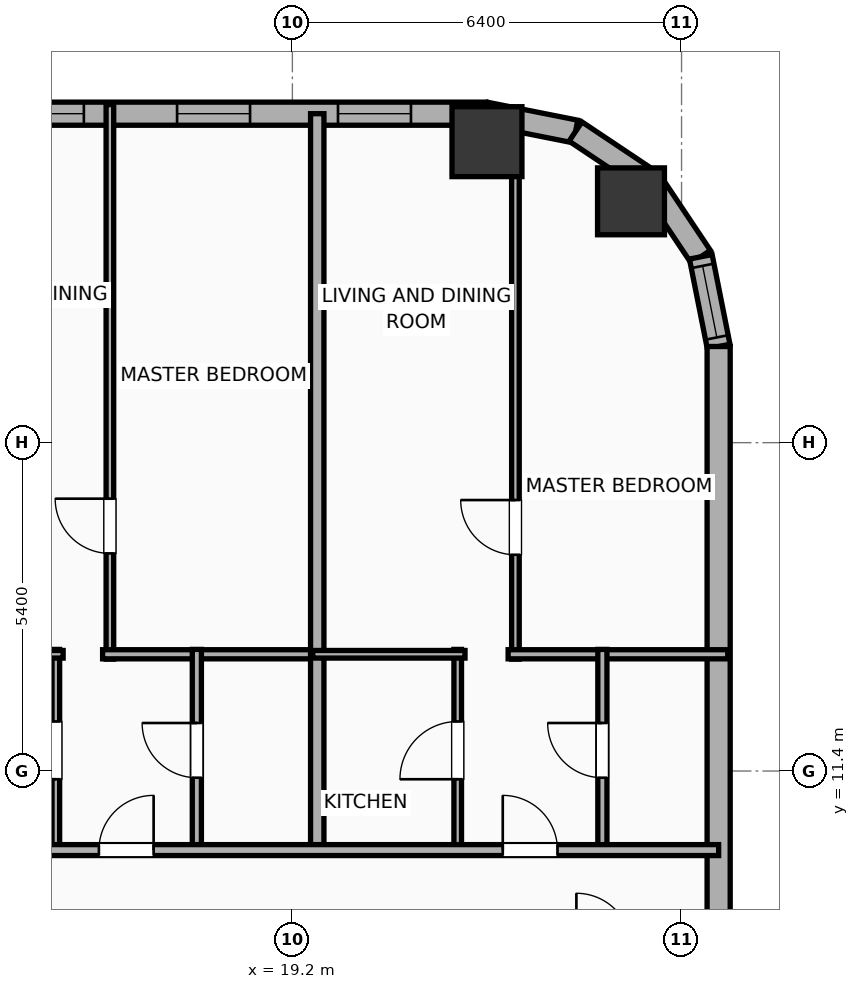
"""IFC4 building model, lengths in metres.
Left out: names, types, materials, properties, quantities, classifications, styles, units other than length and angle.
Written with IfcOpenShell. Run it as: python <this file> out.ifc"""

import sys

from ifc_helpers import new_model, si_unit, direction, frame, frame_2d, origin, origin_2d, place, context, subcontext, project, spatial, rectangle, hollow_rectangle, hollow_circle, extrude, element, fill, save


model = new_model("IFC4")
c1 = context("Model", 3, precision=1e-05, world=origin(), true_north=direction((0.0, 1.0)))
c2 = subcontext(c1, "Body", "Model", "MODEL_VIEW")
j1 = project(units=[si_unit("LENGTHUNIT", "METRE"), si_unit("PLANEANGLEUNIT", "RADIAN")], contexts=[c1])
p1 = place(None, origin())
s1 = spatial("IfcSite", under=j1, at=p1, CompositionType="ELEMENT")
p2 = place(p1, origin())
s2 = spatial("IfcBuilding", under=s1, at=p2, CompositionType="ELEMENT")
p3 = place(p2, frame((0.0, 0.0, 45.5)))
s3 = spatial("IfcBuildingStorey", under=s2, at=p3, CompositionType="ELEMENT", Elevation=45.5)
p4 = place(p3, frame((24.769, 20.769, 0.0), z_axis=(0.0, 0.0, 1.0), x_axis=(1.0, 0.0, 0.0)))
e1 = element("IfcColumn", 1, at=p4, inside=s3, PredefinedType="COLUMN", context=c2, shape_type="SweptSolid", body=[
    extrude(hollow_circle(Radius=0.55, WallThickness=0.036, at=origin_2d()), origin(), (0.0, 0.0, 1.0), 3.9),
])
p5 = place(p3, frame((22.4, 21.75, 0.0), z_axis=(0.0, 0.0, 1.0), x_axis=(1.0, 0.0, 0.0)))
e2 = element("IfcColumn", 2, at=p5, inside=s3, PredefinedType="COLUMN", context=c2, shape_type="SweptSolid", body=[
    extrude(hollow_rectangle(XDim=1.15, YDim=1.15, WallThickness=0.04, at=origin_2d()), origin(), (0.0, 0.0, 1.0), 3.9),
])
p6 = place(p3, frame((-29.581, 22.21, 0.0), z_axis=(0.0, 0.0, 1.0), x_axis=(1.0, 0.0, 0.0)))
e3 = element("IfcWall", 3, at=p6, inside=s3, PredefinedType="ELEMENTEDWALL", context=c2, shape_type="SweptSolid", body=[
    extrude(rectangle(XDim=51.963, YDim=0.38, at=frame_2d((25.981, 0.0))), origin(), (0.0, 0.0, 1.0), 3.65),
])
p7 = place(p6, frame((25.631, 0.0, 0.75)))
e4 = element("IfcOpeningElement", 4, at=p7, cuts=e3, PredefinedType="OPENING", context=c2, shape_type="SweptSolid", body=[
    extrude(rectangle(XDim=2.4, YDim=2.1, at=frame_2d((1.2, 1.05))), frame((0.0, 0.2, 0.0), z_axis=(0.0, -1.0, 0.0), x_axis=(1.0, 0.0, 0.0)), (0.0, 0.0, 1.0), 0.4),
])
p8 = place(p6, frame((42.952, 0.0, 0.75)))
e5 = element("IfcOpeningElement", 5, at=p8, cuts=e3, PredefinedType="OPENING", context=c2, shape_type="SweptSolid", body=[
    extrude(rectangle(XDim=2.4, YDim=2.1, at=frame_2d((1.2, 1.05))), frame((0.0, 0.2, 0.0), z_axis=(0.0, -1.0, 0.0), x_axis=(1.0, 0.0, 0.0)), (0.0, 0.0, 1.0), 0.4),
])
p9 = place(p6, frame((1.731, 0.0, 0.75)))
e6 = element("IfcOpeningElement", 6, at=p9, cuts=e3, PredefinedType="OPENING", context=c2, shape_type="SweptSolid", body=[
    extrude(rectangle(XDim=1.2, YDim=2.05, at=frame_2d((0.6, 1.025))), frame((0.0, 0.2, 0.0), z_axis=(0.0, -1.0, 0.0), x_axis=(1.0, 0.0, 0.0)), (0.0, 0.0, 1.0), 0.4),
])
p10 = place(p6, frame((5.272, 0.0, 0.75)))
e7 = element("IfcOpeningElement", 7, at=p10, cuts=e3, PredefinedType="OPENING", context=c2, shape_type="SweptSolid", body=[
    extrude(rectangle(XDim=1.2, YDim=2.05, at=frame_2d((0.6, 1.025))), frame((0.0, 0.2, 0.0), z_axis=(0.0, -1.0, 0.0), x_axis=(1.0, 0.0, 0.0)), (0.0, 0.0, 1.0), 0.4),
])
p11 = place(p6, frame((8.356, 0.0, 0.75)))
e8 = element("IfcOpeningElement", 8, at=p11, cuts=e3, PredefinedType="OPENING", context=c2, shape_type="SweptSolid", body=[
    extrude(rectangle(XDim=1.2, YDim=2.05, at=frame_2d((0.6, 1.025))), frame((0.0, 0.2, 0.0), z_axis=(0.0, -1.0, 0.0), x_axis=(1.0, 0.0, 0.0)), (0.0, 0.0, 1.0), 0.4),
])
p12 = place(p6, frame((15.632, 0.0, 0.75)))
e9 = element("IfcOpeningElement", 9, at=p12, cuts=e3, PredefinedType="OPENING", context=c2, shape_type="SweptSolid", body=[
    extrude(rectangle(XDim=1.2, YDim=2.05, at=frame_2d((0.6, 1.025))), frame((0.0, 0.2, 0.0), z_axis=(0.0, -1.0, 0.0), x_axis=(1.0, 0.0, 0.0)), (0.0, 0.0, 1.0), 0.4),
])
p13 = place(p6, frame((12.137, 0.0, 0.75)))
e10 = element("IfcOpeningElement", 10, at=p13, cuts=e3, PredefinedType="OPENING", context=c2, shape_type="SweptSolid", body=[
    extrude(rectangle(XDim=1.2, YDim=2.05, at=frame_2d((0.6, 1.025))), frame((0.0, 0.2, 0.0), z_axis=(0.0, -1.0, 0.0), x_axis=(1.0, 0.0, 0.0)), (0.0, 0.0, 1.0), 0.4),
])
p14 = place(p6, frame((18.756, 0.0, 0.75)))
e11 = element("IfcOpeningElement", 11, at=p14, cuts=e3, PredefinedType="OPENING", context=c2, shape_type="SweptSolid", body=[
    extrude(rectangle(XDim=1.2, YDim=2.05, at=frame_2d((0.6, 1.025))), frame((0.0, 0.2, 0.0), z_axis=(0.0, -1.0, 0.0), x_axis=(1.0, 0.0, 0.0)), (0.0, 0.0, 1.0), 0.4),
])
p15 = place(p6, frame((22.907, 0.0, 0.75)))
e12 = element("IfcOpeningElement", 12, at=p15, cuts=e3, PredefinedType="OPENING", context=c2, shape_type="SweptSolid", body=[
    extrude(rectangle(XDim=1.2, YDim=2.05, at=frame_2d((0.6, 1.025))), frame((0.0, 0.2, 0.0), z_axis=(0.0, -1.0, 0.0), x_axis=(1.0, 0.0, 0.0)), (0.0, 0.0, 1.0), 0.4),
])
p16 = place(p6, frame((36.381, 0.0, 0.75)))
e13 = element("IfcOpeningElement", 13, at=p16, cuts=e3, PredefinedType="OPENING", context=c2, shape_type="SweptSolid", body=[
    extrude(rectangle(XDim=1.2, YDim=2.05, at=frame_2d((0.6, 1.025))), frame((0.0, 0.2, 0.0), z_axis=(0.0, -1.0, 0.0), x_axis=(1.0, 0.0, 0.0)), (0.0, 0.0, 1.0), 0.4),
])
p17 = place(p6, frame((32.886, 0.0, 0.75)))
e14 = element("IfcOpeningElement", 14, at=p17, cuts=e3, PredefinedType="OPENING", context=c2, shape_type="SweptSolid", body=[
    extrude(rectangle(XDim=1.2, YDim=2.05, at=frame_2d((0.6, 1.025))), frame((0.0, 0.2, 0.0), z_axis=(0.0, -1.0, 0.0), x_axis=(1.0, 0.0, 0.0)), (0.0, 0.0, 1.0), 0.4),
])
p18 = place(p6, frame((39.556, 0.0, 0.75)))
e15 = element("IfcOpeningElement", 15, at=p18, cuts=e3, PredefinedType="OPENING", context=c2, shape_type="SweptSolid", body=[
    extrude(rectangle(XDim=1.2, YDim=2.05, at=frame_2d((0.6, 1.025))), frame((0.0, 0.2, 0.0), z_axis=(0.0, -1.0, 0.0), x_axis=(1.0, 0.0, 0.0)), (0.0, 0.0, 1.0), 0.4),
])
p19 = place(p6, frame((46.885, 0.0, 0.75)))
e16 = element("IfcOpeningElement", 16, at=p19, cuts=e3, PredefinedType="OPENING", context=c2, shape_type="SweptSolid", body=[
    extrude(rectangle(XDim=1.2, YDim=2.05, at=frame_2d((0.6, 1.025))), frame((0.0, 0.2, 0.0), z_axis=(0.0, -1.0, 0.0), x_axis=(1.0, 0.0, 0.0)), (0.0, 0.0, 1.0), 0.4),
])
p20 = place(p6, frame((49.531, 0.0, 0.75)))
e17 = element("IfcOpeningElement", 17, at=p20, cuts=e3, PredefinedType="OPENING", context=c2, shape_type="SweptSolid", body=[
    extrude(rectangle(XDim=1.2, YDim=2.05, at=frame_2d((0.6, 1.025))), frame((0.0, 0.2, 0.0), z_axis=(0.0, -1.0, 0.0), x_axis=(1.0, 0.0, 0.0)), (0.0, 0.0, 1.0), 0.4),
])
p21 = place(p3, frame((22.381, 22.21, 0.0), z_axis=(0.0, 0.0, 1.0), x_axis=(0.980786132421, -0.195086038585, 0.0)))
e18 = element("IfcWall", 18, at=p21, inside=s3, PredefinedType="ELEMENTEDWALL", context=c2, shape_type="SweptSolid", body=[
    extrude(rectangle(XDim=1.504, YDim=0.38, at=frame_2d((0.752, 0.0))), origin(), (0.0, 0.0, 1.0), 3.65),
])
for number, where, z_axis, x_axis in (
    (19, (23.857, 21.917, 0.0), (0.0, 0.0, 1.0), (0.831, -0.556, 0.0)),
    (20, (25.091, 21.091, 0.0), (0.0, 0.0, 1.0), (0.556, -0.831, 0.0)),
):
    element("IfcWall", number, at=place(p3, frame(where, z_axis=z_axis, x_axis=x_axis)), inside=s3, PredefinedType="ELEMENTEDWALL", context=c2, shape_type="SweptSolid", body=[
        extrude(rectangle(XDim=1.485, YDim=0.38, at=frame_2d((0.743, 0.0))), origin(), (0.0, 0.0, 1.0), 3.65),
    ])
p22 = place(p3, frame((25.917, 19.857, 0.0), z_axis=(0.0, 0.0, 1.0), x_axis=(0.195086038585, -0.980786132421, 0.0)))
e21 = element("IfcWall", 21, at=p22, inside=s3, PredefinedType="ELEMENTEDWALL", context=c2, shape_type="SweptSolid", body=[
    extrude(rectangle(XDim=1.504, YDim=0.38, at=frame_2d((0.752, 0.0))), origin(), (0.0, 0.0, 1.0), 3.65),
])
p23 = place(p22, frame((0.152, 0.0, 0.75)))
e22 = element("IfcOpeningElement", 22, at=p23, cuts=e21, PredefinedType="OPENING", context=c2, shape_type="SweptSolid", body=[
    extrude(rectangle(XDim=1.2, YDim=2.05, at=frame_2d((0.6, 1.025))), frame((0.0, 0.2, 0.0), z_axis=(0.0, -1.0, 0.0), x_axis=(1.0, 0.0, 0.0)), (0.0, 0.0, 1.0), 0.4),
])
p24 = place(p3, frame((26.21, 18.381, 0.0), z_axis=(0.0, 0.0, 1.0), x_axis=(0.0, -1.0, 0.0)))
e23 = element("IfcWall", 23, at=p24, inside=s3, PredefinedType="ELEMENTEDWALL", context=c2, shape_type="SweptSolid", body=[
    extrude(rectangle(XDim=36.763, YDim=0.38, at=frame_2d((18.381, 0.0))), origin(), (0.0, 0.0, 1.0), 3.65),
])
p25 = place(p3, frame((16.199, 13.24, 0.0), z_axis=(0.0, 0.0, 1.0), x_axis=(0.0, 1.0, 0.0)))
e24 = element("IfcWall", 24, at=p25, inside=s3, PredefinedType="PARTITIONING", context=c2, shape_type="SweptSolid", body=[
    extrude(rectangle(XDim=9.12, YDim=0.125, at=frame_2d((4.56, 0.0))), origin(), (0.0, 0.0, 1.0), 3.65),
])
p26 = place(p25, frame((1.739, 0.0, 0.0)))
e25 = element("IfcOpeningElement", 25, at=p26, cuts=e24, PredefinedType="OPENING", context=c2, shape_type="SweptSolid", body=[
    extrude(rectangle(XDim=0.9, YDim=2.05, at=frame_2d((0.45, 1.025))), frame((0.0, 0.073, 0.0), z_axis=(0.0, -1.0, 0.0), x_axis=(1.0, 0.0, 0.0)), (0.0, 0.0, 1.0), 0.145),
])
p27 = place(p3, frame((16.079, 13.32, 0.0), z_axis=(0.0, 0.0, 1.0), x_axis=(1.0, 0.0, 0.0)))
e26 = element("IfcWall", 26, at=p27, inside=s3, PredefinedType="PLUMBINGWALL", context=c2, shape_type="SweptSolid", body=[
    extrude(rectangle(XDim=3.605, YDim=0.15, at=frame_2d((1.802, 0.0))), origin(), (0.0, 0.0, 1.0), 3.65),
])
p28 = place(p3, frame((15.31, 10.08, 0.0), z_axis=(0.0, 0.0, 1.0), x_axis=(0.0, 1.0, 0.0)))
e27 = element("IfcWall", 27, at=p28, inside=s3, PredefinedType="PARTITIONING", context=c2, shape_type="SweptSolid", body=[
    extrude(rectangle(XDim=3.32, YDim=0.125, at=frame_2d((1.66, 0.0))), origin(), (0.0, 0.0, 1.0), 3.65),
])
p29 = place(p28, frame((1.185, 0.0, 0.0)))
e28 = element("IfcOpeningElement", 28, at=p29, cuts=e27, PredefinedType="OPENING", context=c2, shape_type="SweptSolid", body=[
    extrude(rectangle(XDim=0.95, YDim=2.05, at=frame_2d((0.475, 1.025))), frame((0.0, 0.073, 0.0), z_axis=(0.0, -1.0, 0.0), x_axis=(1.0, 0.0, 0.0)), (0.0, 0.0, 1.0), 0.145),
])
p30 = place(p3, frame((12.925, 13.32, 0.0), z_axis=(0.0, 0.0, 1.0), x_axis=(1.0, 0.0, 0.0)))
e29 = element("IfcWall", 29, at=p30, inside=s3, PredefinedType="PARTITIONING", context=c2, shape_type="SweptSolid", body=[
    extrude(rectangle(XDim=2.505, YDim=0.125, at=frame_2d((1.252, 0.0))), origin(), (0.0, 0.0, 1.0), 3.65),
])
p31 = place(p3, frame((17.629, 10.08, 0.0), z_axis=(0.0, 0.0, 1.0), x_axis=(0.0, 1.0, 0.0)))
e30 = element("IfcWall", 30, at=p31, inside=s3, PredefinedType="PLUMBINGWALL", context=c2, shape_type="SweptSolid", body=[
    extrude(rectangle(XDim=3.32, YDim=0.15, at=frame_2d((1.66, 0.0))), origin(), (0.0, 0.0, 1.0), 3.65),
])
p32 = place(p31, frame((1.21, 0.0, 0.0)))
e31 = element("IfcOpeningElement", 31, at=p32, cuts=e30, PredefinedType="OPENING", context=c2, shape_type="SweptSolid", body=[
    extrude(rectangle(XDim=0.9, YDim=2.05, at=frame_2d((0.45, 1.025))), frame((0.0, 0.085, 0.0), z_axis=(0.0, -1.0, 0.0), x_axis=(1.0, 0.0, 0.0)), (0.0, 0.0, 1.0), 0.17),
])
p33 = place(p3, frame((19.609, 10.02, 0.0), z_axis=(0.0, 0.0, 1.0), x_axis=(0.0, 1.0, 0.0)))
e32 = element("IfcWall", 32, at=p33, inside=s3, PredefinedType="PARTITIONING", context=c2, shape_type="SweptSolid", body=[
    extrude(rectangle(XDim=12.19, YDim=0.22, at=frame_2d((6.095, 0.0))), origin(), (0.0, 0.0, 1.0), 3.65),
])
p34 = place(p3, frame((22.868, 13.24, 0.0), z_axis=(0.0, 0.0, 1.0), x_axis=(0.0, 1.0, 0.0)))
e33 = element("IfcWall", 33, at=p34, inside=s3, PredefinedType="PARTITIONING", context=c2, shape_type="SweptSolid", body=[
    extrude(rectangle(XDim=9.026, YDim=0.125, at=frame_2d((4.513, 0.0))), origin(), (0.0, 0.0, 1.0), 2.94),
])
p35 = place(p34, frame((1.716, 0.0, 0.0)))
e34 = element("IfcOpeningElement", 34, at=p35, cuts=e33, PredefinedType="OPENING", context=c2, shape_type="SweptSolid", body=[
    extrude(rectangle(XDim=0.9, YDim=2.05, at=frame_2d((0.45, 1.025))), frame((0.0, 0.073, 0.0), z_axis=(0.0, -1.0, 0.0), x_axis=(1.0, 0.0, 0.0)), (0.0, 0.0, 1.0), 0.145),
])
p36 = place(p3, frame((22.748, 13.32, 0.0), z_axis=(0.0, 0.0, 1.0), x_axis=(1.0, 0.0, 0.0)))
e35 = element("IfcWall", 35, at=p36, inside=s3, PredefinedType="PLUMBINGWALL", context=c2, shape_type="SweptSolid", body=[
    extrude(rectangle(XDim=3.612, YDim=0.15, at=frame_2d((1.806, 0.0))), origin(), (0.0, 0.0, 1.0), 3.65),
])
p37 = place(p3, frame((21.919, 10.08, 0.0), z_axis=(0.0, 0.0, 1.0), x_axis=(0.0, 1.0, 0.0)))
e36 = element("IfcWall", 36, at=p37, inside=s3, PredefinedType="PARTITIONING", context=c2, shape_type="SweptSolid", body=[
    extrude(rectangle(XDim=3.32, YDim=0.125, at=frame_2d((1.66, 0.0))), origin(), (0.0, 0.0, 1.0), 3.65),
])
p38 = place(p37, frame((1.185, 0.0, 0.0)))
e37 = element("IfcOpeningElement", 37, at=p38, cuts=e36, PredefinedType="OPENING", context=c2, shape_type="SweptSolid", body=[
    extrude(rectangle(XDim=0.95, YDim=2.05, at=frame_2d((0.475, 1.025))), frame((0.0, 0.073, 0.0), z_axis=(0.0, -1.0, 0.0), x_axis=(1.0, 0.0, 0.0)), (0.0, 0.0, 1.0), 0.145),
])
p39 = place(p3, frame((19.534, 13.32, 0.0), z_axis=(0.0, 0.0, 1.0), x_axis=(1.0, 0.0, 0.0)))
e38 = element("IfcWall", 38, at=p39, inside=s3, PredefinedType="PARTITIONING", context=c2, shape_type="SweptSolid", body=[
    extrude(rectangle(XDim=2.505, YDim=0.125, at=frame_2d((1.252, 0.0))), origin(), (0.0, 0.0, 1.0), 3.65),
])
p40 = place(p3, frame((24.298, 10.08, 0.0), z_axis=(0.0, 0.0, 1.0), x_axis=(0.0, 1.0, 0.0)))
e39 = element("IfcWall", 39, at=p40, inside=s3, PredefinedType="PLUMBINGWALL", context=c2, shape_type="SweptSolid", body=[
    extrude(rectangle(XDim=3.32, YDim=0.15, at=frame_2d((1.66, 0.0))), origin(), (0.0, 0.0, 1.0), 3.65),
])
p41 = place(p40, frame((1.21, 0.0, 0.0)))
e40 = element("IfcOpeningElement", 40, at=p41, cuts=e39, PredefinedType="OPENING", context=c2, shape_type="SweptSolid", body=[
    extrude(rectangle(XDim=0.9, YDim=2.05, at=frame_2d((0.45, 1.025))), frame((0.0, 0.085, 0.0), z_axis=(0.0, -1.0, 0.0), x_axis=(1.0, 0.0, 0.0)), (0.0, 0.0, 1.0), 0.17),
])
p42 = place(p3, frame((-33.41, 10.1, 0.0), z_axis=(0.0, 0.0, 1.0), x_axis=(1.0, 0.0, 0.0)))
e41 = element("IfcWall", 41, at=p42, inside=s3, PredefinedType="PARTITIONING", context=c2, shape_type="SweptSolid", body=[
    extrude(rectangle(XDim=59.62, YDim=0.18, at=frame_2d((29.81, 0.0))), origin(), (0.0, 0.0, 1.0), 3.65),
])
p43 = place(p42, frame((3.354, 0.0, 0.0)))
e42 = element("IfcOpeningElement", 42, at=p43, cuts=e41, PredefinedType="OPENING", context=c2, shape_type="SweptSolid", body=[
    extrude(rectangle(XDim=1.15, YDim=2.05, at=frame_2d((0.575, 1.025))), frame((0.0, 0.1, 0.0), z_axis=(0.0, -1.0, 0.0), x_axis=(1.0, 0.0, 0.0)), (0.0, 0.0, 1.0), 0.2),
])
p44 = place(p42, frame((10.997, 0.0, 0.0)))
e43 = element("IfcOpeningElement", 43, at=p44, cuts=e41, PredefinedType="OPENING", context=c2, shape_type="SweptSolid", body=[
    extrude(rectangle(XDim=1.15, YDim=2.05, at=frame_2d((0.575, 1.025))), frame((0.0, 0.1, 0.0), z_axis=(0.0, -1.0, 0.0), x_axis=(1.0, 0.0, 0.0)), (0.0, 0.0, 1.0), 0.2),
])
p45 = place(p42, frame((20.232, 0.0, 0.0)))
e44 = element("IfcOpeningElement", 44, at=p45, cuts=e41, PredefinedType="OPENING", context=c2, shape_type="SweptSolid", body=[
    extrude(rectangle(XDim=1.15, YDim=2.05, at=frame_2d((0.575, 1.025))), frame((0.0, 0.1, 0.0), z_axis=(0.0, -1.0, 0.0), x_axis=(1.0, 0.0, 0.0)), (0.0, 0.0, 1.0), 0.2),
])
p46 = place(p42, frame((30.38, 0.0, 0.0)))
e45 = element("IfcOpeningElement", 45, at=p46, cuts=e41, PredefinedType="OPENING", context=c2, shape_type="SweptSolid", body=[
    extrude(rectangle(XDim=1.15, YDim=2.05, at=frame_2d((0.575, 1.025))), frame((0.0, 0.1, 0.0), z_axis=(0.0, -1.0, 0.0), x_axis=(1.0, 0.0, 0.0)), (0.0, 0.0, 1.0), 0.2),
])
p47 = place(p42, frame((40.998, 0.0, 0.0)))
e46 = element("IfcOpeningElement", 46, at=p47, cuts=e41, PredefinedType="OPENING", context=c2, shape_type="SweptSolid", body=[
    extrude(rectangle(XDim=1.15, YDim=2.05, at=frame_2d((0.575, 1.025))), frame((0.0, 0.1, 0.0), z_axis=(0.0, -1.0, 0.0), x_axis=(1.0, 0.0, 0.0)), (0.0, 0.0, 1.0), 0.2),
])
p48 = place(p42, frame((49.428, 0.0, 0.0)))
e47 = element("IfcOpeningElement", 47, at=p48, cuts=e41, PredefinedType="OPENING", context=c2, shape_type="SweptSolid", body=[
    extrude(rectangle(XDim=0.9, YDim=2.05, at=frame_2d((0.45, 1.025))), frame((0.0, 0.1, 0.0), z_axis=(0.0, -1.0, 0.0), x_axis=(1.0, 0.0, 0.0)), (0.0, 0.0, 1.0), 0.2),
])
p49 = place(p42, frame((56.07, 0.0, 0.0)))
e48 = element("IfcOpeningElement", 48, at=p49, cuts=e41, PredefinedType="OPENING", context=c2, shape_type="SweptSolid", body=[
    extrude(rectangle(XDim=0.9, YDim=2.05, at=frame_2d((0.45, 1.025))), frame((0.0, 0.1, 0.0), z_axis=(0.0, -1.0, 0.0), x_axis=(1.0, 0.0, 0.0)), (0.0, 0.0, 1.0), 0.2),
])
p50 = place(p8, origin())
e49 = element("IfcWindow", 49, at=p50, inside=s3, PartitioningType="SINGLE_PANEL", PredefinedType="WINDOW", context=c2, shape_type="SweptSolid", body=[
    extrude(rectangle(XDim=2.4, YDim=2.1, at=frame_2d((1.2, 1.05))), frame((0.0, 0.03, 0.0), z_axis=(0.0, -1.0, 0.0), x_axis=(1.0, 0.0, 0.0)), (0.0, 0.0, 1.0), 0.06),
])
fill(e5, e49)
p51 = place(p19, origin())
e50 = element("IfcWindow", 50, at=p51, inside=s3, PartitioningType="SINGLE_PANEL", PredefinedType="WINDOW", context=c2, shape_type="SweptSolid", body=[
    extrude(rectangle(XDim=1.2, YDim=2.05, at=frame_2d((0.6, 1.025))), frame((0.0, 0.03, 0.0), z_axis=(0.0, -1.0, 0.0), x_axis=(1.0, 0.0, 0.0)), (0.0, 0.0, 1.0), 0.06),
])
fill(e16, e50)
p52 = place(p20, origin())
e51 = element("IfcWindow", 51, at=p52, inside=s3, PartitioningType="SINGLE_PANEL", PredefinedType="WINDOW", context=c2, shape_type="SweptSolid", body=[
    extrude(rectangle(XDim=1.2, YDim=2.05, at=frame_2d((0.6, 1.025))), frame((0.0, 0.03, 0.0), z_axis=(0.0, -1.0, 0.0), x_axis=(1.0, 0.0, 0.0)), (0.0, 0.0, 1.0), 0.06),
])
fill(e17, e51)
p53 = place(p23, origin())
e52 = element("IfcWindow", 52, at=p53, inside=s3, PartitioningType="SINGLE_PANEL", PredefinedType="WINDOW", context=c2, shape_type="SweptSolid", body=[
    extrude(rectangle(XDim=1.2, YDim=2.05, at=frame_2d((0.6, 1.025))), frame((0.0, 0.03, 0.0), z_axis=(0.0, -1.0, 0.0), x_axis=(1.0, 0.0, 0.0)), (0.0, 0.0, 1.0), 0.06),
])
fill(e22, e52)
p54 = place(p26, origin())
e53 = element("IfcDoor", 53, at=p54, inside=s3, OperationType="SINGLE_SWING_RIGHT", PredefinedType="DOOR", context=c2, shape_type="SweptSolid", body=[
    extrude(rectangle(XDim=0.9, YDim=2.05, at=frame_2d((0.45, 1.025))), frame((0.0, 0.025, 0.0), z_axis=(0.0, -1.0, 0.0), x_axis=(1.0, 0.0, 0.0)), (0.0, 0.0, 1.0), 0.05),
])
fill(e25, e53)
p55 = place(p29, origin())
e54 = element("IfcDoor", 54, at=p55, inside=s3, OperationType="SINGLE_SWING_LEFT", PredefinedType="DOOR", context=c2, shape_type="SweptSolid", body=[
    extrude(rectangle(XDim=0.95, YDim=2.05, at=frame_2d((0.475, 1.025))), frame((0.0, 0.025, 0.0), z_axis=(0.0, -1.0, 0.0), x_axis=(1.0, 0.0, 0.0)), (0.0, 0.0, 1.0), 0.05),
])
fill(e28, e54)
p56 = place(p32, origin())
e55 = element("IfcDoor", 55, at=p56, inside=s3, OperationType="SINGLE_SWING_RIGHT", PredefinedType="DOOR", context=c2, shape_type="SweptSolid", body=[
    extrude(rectangle(XDim=0.9, YDim=2.05, at=frame_2d((0.45, 1.025))), frame((0.0, 0.025, 0.0), z_axis=(0.0, -1.0, 0.0), x_axis=(1.0, 0.0, 0.0)), (0.0, 0.0, 1.0), 0.05),
])
fill(e31, e55)
p57 = place(p35, origin())
e56 = element("IfcDoor", 56, at=p57, inside=s3, OperationType="SINGLE_SWING_RIGHT", PredefinedType="DOOR", context=c2, shape_type="SweptSolid", body=[
    extrude(rectangle(XDim=0.9, YDim=2.05, at=frame_2d((0.45, 1.025))), frame((0.0, 0.025, 0.0), z_axis=(0.0, -1.0, 0.0), x_axis=(1.0, 0.0, 0.0)), (0.0, 0.0, 1.0), 0.05),
])
fill(e34, e56)
p58 = place(p38, origin())
e57 = element("IfcDoor", 57, at=p58, inside=s3, OperationType="SINGLE_SWING_LEFT", PredefinedType="DOOR", context=c2, shape_type="SweptSolid", body=[
    extrude(rectangle(XDim=0.95, YDim=2.05, at=frame_2d((0.475, 1.025))), frame((0.0, 0.025, 0.0), z_axis=(0.0, -1.0, 0.0), x_axis=(1.0, 0.0, 0.0)), (0.0, 0.0, 1.0), 0.05),
])
fill(e37, e57)
p59 = place(p41, origin())
e58 = element("IfcDoor", 58, at=p59, inside=s3, OperationType="SINGLE_SWING_RIGHT", PredefinedType="DOOR", context=c2, shape_type="SweptSolid", body=[
    extrude(rectangle(XDim=0.9, YDim=2.05, at=frame_2d((0.45, 1.025))), frame((0.0, 0.025, 0.0), z_axis=(0.0, -1.0, 0.0), x_axis=(1.0, 0.0, 0.0)), (0.0, 0.0, 1.0), 0.05),
])
fill(e40, e58)
p60 = place(p48, origin())
e59 = element("IfcDoor", 59, at=p60, inside=s3, OperationType="SINGLE_SWING_RIGHT", PredefinedType="DOOR", context=c2, shape_type="SweptSolid", body=[
    extrude(rectangle(XDim=0.9, YDim=2.05, at=frame_2d((0.45, 1.025))), frame((0.0, 0.025, 0.0), z_axis=(0.0, -1.0, 0.0), x_axis=(1.0, 0.0, 0.0)), (0.0, 0.0, 1.0), 0.05),
])
fill(e47, e59)
p61 = place(p49, origin())
e60 = element("IfcDoor", 60, at=p61, inside=s3, OperationType="SINGLE_SWING_LEFT", PredefinedType="DOOR", context=c2, shape_type="SweptSolid", body=[
    extrude(rectangle(XDim=0.9, YDim=2.05, at=frame_2d((0.45, 1.025))), frame((0.0, 0.025, 0.0), z_axis=(0.0, -1.0, 0.0), x_axis=(1.0, 0.0, 0.0)), (0.0, 0.0, 1.0), 0.05),
])
fill(e48, e60)
save(model, sys.argv[1])
